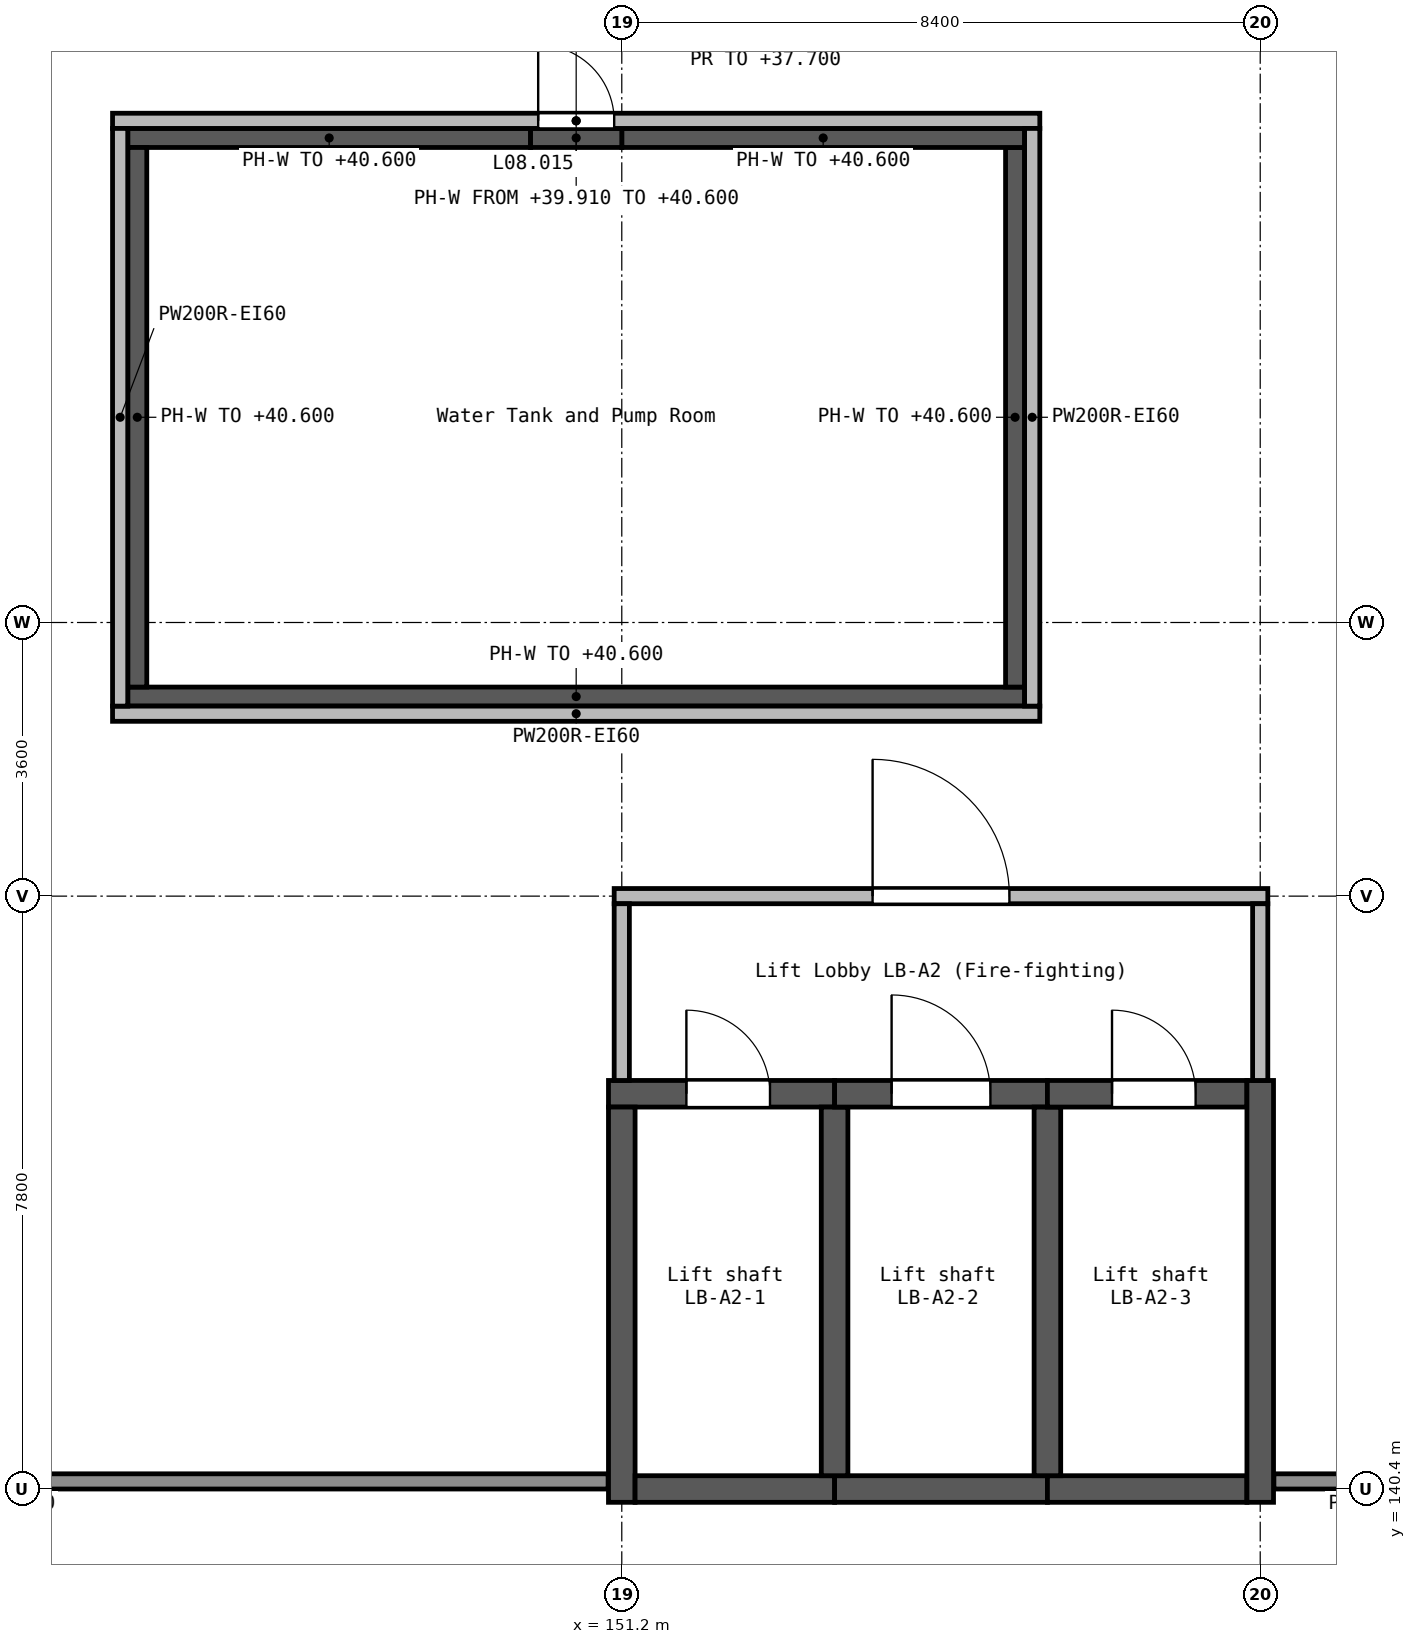
"""IFC4 building model, lengths in metres.
Left out: names, types, materials, properties, quantities, classifications, styles, units other than length and angle.
Written with IfcOpenShell. Run it as: python <this file> out.ifc"""

import sys

from ifc_helpers import new_model, si_unit, direction, frame, frame_2d, origin, place, context, subcontext, project, spatial, polyline, rectangle, outline, extrude, element, fill, save


model = new_model("IFC4")
c1 = context("Model", 3, precision=1e-05, world=origin(), true_north=direction((0.0, 1.0)))
c2 = subcontext(c1, "Body", "Model", "MODEL_VIEW")
j1 = project(units=[si_unit("LENGTHUNIT", "METRE"), si_unit("PLANEANGLEUNIT", "RADIAN")], contexts=[c1])
p1 = place(None, origin())
s1 = spatial("IfcSite", under=j1, at=p1, CompositionType="ELEMENT")
p2 = place(p1, origin())
s2 = spatial("IfcBuilding", under=s1, at=p2, CompositionType="ELEMENT")
p3 = place(p2, frame((0.0, 0.0, 36.6)))
s3 = spatial("IfcBuildingStorey", under=s2, at=p3, CompositionType="ELEMENT", Elevation=36.6)
p4 = place(p3, frame((151.025, 145.6, 0.0), z_axis=(0.0, 0.0, 1.0), x_axis=(1.0, 0.0, 0.0)))
e1 = element("IfcWall", 1, at=p4, inside=s3, PredefinedType="SHEAR", context=c2, shape_type="SweptSolid", body=[
    extrude(rectangle(XDim=2.975, YDim=0.35, at=frame_2d((1.488, 0.0))), origin(), (0.0, 0.0, 1.0), 4.0),
])
p5 = place(p4, frame((1.025, 0.0, 0.0)))
e2 = element("IfcOpeningElement", 2, at=p5, cuts=e1, PredefinedType="OPENING", context=c2, shape_type="SweptSolid", body=[
    extrude(rectangle(XDim=1.1, YDim=2.1, at=frame_2d((0.55, 1.05))), frame((0.0, 0.185, 0.0), z_axis=(0.0, -1.0, 0.0), x_axis=(1.0, 0.0, 0.0)), (0.0, 0.0, 1.0), 0.37),
])
p6 = place(p3, frame((151.2, 140.225, 0.0), z_axis=(0.0, 0.0, 1.0), x_axis=(0.0, 1.0, 0.0)))
e3 = element("IfcWall", 3, at=p6, inside=s3, PredefinedType="SHEAR", context=c2, shape_type="SweptSolid", body=[
    extrude(rectangle(XDim=5.2, YDim=0.35, at=frame_2d((2.6, 0.0))), origin(), (0.0, 0.0, 1.0), 4.0),
])
p7 = place(p3, frame((151.375, 140.4, 0.0), z_axis=(0.0, 0.0, 1.0), x_axis=(1.0, 0.0, 0.0)))
e4 = element("IfcWall", 4, at=p7, inside=s3, PredefinedType="SHEAR", context=c2, shape_type="SweptSolid", body=[
    extrude(rectangle(XDim=2.625, YDim=0.35, at=frame_2d((1.312, 0.0))), origin(), (0.0, 0.0, 1.0), 4.0),
])
p8 = place(p3, frame((154.0, 140.4, 0.0), z_axis=(0.0, 0.0, 1.0), x_axis=(1.0, 0.0, 0.0)))
e5 = element("IfcWall", 5, at=p8, inside=s3, PredefinedType="SHEAR", context=c2, shape_type="SweptSolid", body=[
    extrude(rectangle(XDim=2.8, YDim=0.35, at=frame_2d((1.4, 0.0))), origin(), (0.0, 0.0, 1.0), 4.0),
])
p9 = place(p3, frame((154.0, 140.575, 0.0), z_axis=(0.0, 0.0, 1.0), x_axis=(0.0, 1.0, 0.0)))
e6 = element("IfcWall", 6, at=p9, inside=s3, PredefinedType="SHEAR", context=c2, shape_type="SweptSolid", body=[
    extrude(rectangle(XDim=4.85, YDim=0.35, at=frame_2d((2.425, 0.0))), origin(), (0.0, 0.0, 1.0), 4.0),
])
p10 = place(p3, frame((154.0, 145.6, 0.0), z_axis=(0.0, 0.0, 1.0), x_axis=(1.0, 0.0, 0.0)))
e7 = element("IfcWall", 7, at=p10, inside=s3, PredefinedType="SHEAR", context=c2, shape_type="SweptSolid", body=[
    extrude(rectangle(XDim=2.8, YDim=0.35, at=frame_2d((1.4, 0.0))), origin(), (0.0, 0.0, 1.0), 4.0),
])
p11 = place(p10, frame((0.75, 0.0, 0.0)))
e8 = element("IfcOpeningElement", 8, at=p11, cuts=e7, PredefinedType="OPENING", context=c2, shape_type="SweptSolid", body=[
    extrude(rectangle(XDim=1.3, YDim=2.1, at=frame_2d((0.65, 1.05))), frame((0.0, 0.185, 0.0), z_axis=(0.0, -1.0, 0.0), x_axis=(1.0, 0.0, 0.0)), (0.0, 0.0, 1.0), 0.37),
])
p12 = place(p3, frame((156.8, 140.4, 0.0), z_axis=(0.0, 0.0, 1.0), x_axis=(1.0, 0.0, 0.0)))
e9 = element("IfcWall", 9, at=p12, inside=s3, PredefinedType="SHEAR", context=c2, shape_type="SweptSolid", body=[
    extrude(rectangle(XDim=2.625, YDim=0.35, at=frame_2d((1.312, 0.0))), origin(), (0.0, 0.0, 1.0), 4.0),
])
p13 = place(p3, frame((156.8, 140.575, 0.0), z_axis=(0.0, 0.0, 1.0), x_axis=(0.0, 1.0, 0.0)))
e10 = element("IfcWall", 10, at=p13, inside=s3, PredefinedType="SHEAR", context=c2, shape_type="SweptSolid", body=[
    extrude(rectangle(XDim=4.85, YDim=0.35, at=frame_2d((2.425, 0.0))), origin(), (0.0, 0.0, 1.0), 4.0),
])
p14 = place(p3, frame((156.8, 145.6, 0.0), z_axis=(0.0, 0.0, 1.0), x_axis=(1.0, 0.0, 0.0)))
e11 = element("IfcWall", 11, at=p14, inside=s3, PredefinedType="SHEAR", context=c2, shape_type="SweptSolid", body=[
    extrude(rectangle(XDim=2.625, YDim=0.35, at=frame_2d((1.312, 0.0))), origin(), (0.0, 0.0, 1.0), 4.0),
])
p15 = place(p14, frame((0.85, 0.0, 0.0)))
e12 = element("IfcOpeningElement", 12, at=p15, cuts=e11, PredefinedType="OPENING", context=c2, shape_type="SweptSolid", body=[
    extrude(rectangle(XDim=1.1, YDim=2.1, at=frame_2d((0.55, 1.05))), frame((0.0, 0.185, 0.0), z_axis=(0.0, -1.0, 0.0), x_axis=(1.0, 0.0, 0.0)), (0.0, 0.0, 1.0), 0.37),
])
p16 = place(p3, frame((159.6, 140.225, 0.0), z_axis=(0.0, 0.0, 1.0), x_axis=(0.0, 1.0, 0.0)))
e13 = element("IfcWall", 13, at=p16, inside=s3, PredefinedType="SHEAR", context=c2, shape_type="SweptSolid", body=[
    extrude(rectangle(XDim=5.55, YDim=0.35, at=frame_2d((2.775, 0.0))), origin(), (0.0, 0.0, 1.0), 4.0),
])
p17 = place(p3, origin())
e14 = element("IfcWall", 14, at=p17, inside=s3, PredefinedType="PARAPET", context=c2, shape_type="SweptSolid", body=[
    extrude(outline(polyline([(151.02, 140.6), (151.02, 140.4), (134.475, 140.4), (134.475, 140.6), (151.02, 140.6)])), origin(), (0.0, 0.0, 1.0), 1.1),
])
p18 = place(p3, origin())
e15 = element("IfcWall", 15, at=p18, inside=s3, PredefinedType="PARAPET", context=c2, shape_type="SweptSolid", body=[
    extrude(outline(polyline([(163.2, 140.6), (163.2, 140.4), (159.78, 140.4), (159.78, 140.6), (163.2, 140.6)])), origin(), (0.0, 0.0, 1.0), 1.1),
])
p19 = place(p3, origin())
e16 = element("IfcWall", 16, at=p19, inside=s3, PredefinedType="SOLIDWALL", context=c2, shape_type="SweptSolid", body=[
    extrude(outline(polyline([(144.7, 150.7), (156.5, 150.7), (156.5, 150.95), (144.7, 150.95), (144.7, 150.7)])), origin(), (0.0, 0.0, 1.0), 4.0),
])
p20 = place(p3, origin())
e17 = element("IfcWall", 17, at=p20, inside=s3, PredefinedType="SOLIDWALL", context=c2, shape_type="SweptSolid", body=[
    extrude(outline(polyline([(144.7, 158.05), (144.7, 158.3), (150.0, 158.3), (150.0, 158.05), (144.7, 158.05)])), origin(), (0.0, 0.0, 1.0), 4.0),
])
p21 = place(p3, origin())
e18 = element("IfcWall", 18, at=p21, inside=s3, PredefinedType="SOLIDWALL", context=c2, shape_type="SweptSolid", body=[
    extrude(outline(polyline([(144.7, 150.95), (144.95, 150.95), (144.95, 158.05), (144.7, 158.05), (144.7, 150.95)])), origin(), (0.0, 0.0, 1.0), 4.0),
])
p22 = place(p3, origin())
e19 = element("IfcWall", 19, at=p22, inside=s3, PredefinedType="SOLIDWALL", context=c2, shape_type="SweptSolid", body=[
    extrude(outline(polyline([(156.25, 150.95), (156.5, 150.95), (156.5, 158.05), (156.25, 158.05), (156.25, 150.95)])), origin(), (0.0, 0.0, 1.0), 4.0),
])
p23 = place(p3, frame((144.5, 150.6, 0.0), z_axis=(0.0, 0.0, 1.0), x_axis=(1.0, 0.0, 0.0)))
e20 = element("IfcWall", 20, at=p23, inside=s3, PredefinedType="SOLIDWALL", context=c2, shape_type="SweptSolid", body=[
    extrude(rectangle(XDim=12.2, YDim=0.2, at=frame_2d((6.1, 0.0))), origin(), (0.0, 0.0, 1.0), 3.9),
])
p24 = place(p3, frame((144.5, 158.4, 0.0), z_axis=(0.0, 0.0, 1.0), x_axis=(1.0, 0.0, 0.0)))
e21 = element("IfcWall", 21, at=p24, inside=s3, PredefinedType="SOLIDWALL", context=c2, shape_type="SweptSolid", body=[
    extrude(rectangle(XDim=12.2, YDim=0.2, at=frame_2d((6.1, 0.0))), origin(), (0.0, 0.0, 1.0), 3.9),
])
p25 = place(p24, frame((5.6, 0.0, 0.0)))
e22 = element("IfcOpeningElement", 22, at=p25, cuts=e21, PredefinedType="OPENING", context=c2, shape_type="SweptSolid", body=[
    extrude(rectangle(XDim=1.0, YDim=2.1, at=frame_2d((0.5, 1.05))), frame((0.0, 0.11, 0.0), z_axis=(0.0, -1.0, 0.0), x_axis=(1.0, 0.0, 0.0)), (0.0, 0.0, 1.0), 0.22),
])
p26 = place(p3, frame((151.1, 148.2, 0.0), z_axis=(0.0, 0.0, 1.0), x_axis=(1.0, 0.0, 0.0)))
e23 = element("IfcWall", 23, at=p26, inside=s3, PredefinedType="SOLIDWALL", context=c2, shape_type="SweptSolid", body=[
    extrude(rectangle(XDim=8.6, YDim=0.2, at=frame_2d((4.3, 0.0))), origin(), (0.0, 0.0, 1.0), 3.9),
])
p27 = place(p26, frame((3.4, 0.0, 0.0)))
e24 = element("IfcOpeningElement", 24, at=p27, cuts=e23, PredefinedType="OPENING", context=c2, shape_type="SweptSolid", body=[
    extrude(rectangle(XDim=1.8, YDim=2.1, at=frame_2d((0.9, 1.05))), frame((0.0, 0.11, 0.0), z_axis=(0.0, -1.0, 0.0), x_axis=(1.0, 0.0, 0.0)), (0.0, 0.0, 1.0), 0.22),
])
for number, where, z_axis, x_axis in (
    (25, (144.6, 150.7, 0.0), (0.0, 0.0, 1.0), (0.0, 1.0, 0.0)),
    (26, (156.6, 150.7, 0.0), (0.0, 0.0, 1.0), (0.0, 1.0, 0.0)),
):
    element("IfcWall", number, at=place(p3, frame(where, z_axis=z_axis, x_axis=x_axis)), inside=s3, PredefinedType="SOLIDWALL", context=c2, shape_type="SweptSolid", body=[
        extrude(rectangle(XDim=7.6, YDim=0.2, at=frame_2d((3.8, 0.0))), origin(), (0.0, 0.0, 1.0), 3.9),
    ])
for number, where, z_axis, x_axis in (
    (27, (151.2, 145.775, 0.0), (0.0, 0.0, 1.0), (0.0, 1.0, 0.0)),
    (28, (159.6, 145.775, 0.0), (0.0, 0.0, 1.0), (0.0, 1.0, 0.0)),
):
    element("IfcWall", number, at=place(p3, frame(where, z_axis=z_axis, x_axis=x_axis)), inside=s3, PredefinedType="SOLIDWALL", context=c2, shape_type="SweptSolid", body=[
        extrude(rectangle(XDim=2.325, YDim=0.2, at=frame_2d((1.163, 0.0))), origin(), (0.0, 0.0, 1.0), 3.9),
    ])
p28 = place(p3, origin())
e29 = element("IfcWall", 29, at=p28, inside=s3, PredefinedType="SOLIDWALL", context=c2, shape_type="SweptSolid", body=[
    extrude(outline(polyline([(156.5, 158.3), (156.5, 158.05), (151.2, 158.05), (151.2, 158.3), (156.5, 158.3)])), origin(), (0.0, 0.0, 1.0), 4.0),
])
p29 = place(p3, frame((0.0, 0.0, 3.31)))
e30 = element("IfcWall", 30, at=p29, inside=s3, PredefinedType="SOLIDWALL", context=c2, shape_type="SweptSolid", body=[
    extrude(outline(polyline([(150.0, 158.05), (150.0, 158.3), (151.2, 158.3), (151.2, 158.05), (150.0, 158.05)])), origin(), (0.0, 0.0, 1.0), 0.69),
])
p30 = place(p27, frame((1.8, 0.0, 0.0), z_axis=(0.0, 0.0, 1.0), x_axis=(-1.0, 0.0, 0.0)))
e31 = element("IfcDoor", 31, at=p30, inside=s3, OperationType="DOUBLE_DOOR_SINGLE_SWING", PredefinedType="DOOR", context=c2, shape_type="SweptSolid", body=[
    extrude(rectangle(XDim=1.8, YDim=2.1, at=frame_2d((0.9, 1.05))), frame((0.0, 0.025, 0.0), z_axis=(0.0, -1.0, 0.0), x_axis=(1.0, 0.0, 0.0)), (0.0, 0.0, 1.0), 0.05),
])
fill(e24, e31)
p31 = place(p5, origin())
e32 = element("IfcDoor", 32, at=p31, inside=s3, OperationType="DOUBLE_DOOR_SLIDING", PredefinedType="DOOR", context=c2, shape_type="SweptSolid", body=[
    extrude(rectangle(XDim=1.1, YDim=2.1, at=frame_2d((0.55, 1.05))), frame((0.0, 0.025, 0.0), z_axis=(0.0, -1.0, 0.0), x_axis=(1.0, 0.0, 0.0)), (0.0, 0.0, 1.0), 0.05),
])
fill(e2, e32)
p32 = place(p11, origin())
e33 = element("IfcDoor", 33, at=p32, inside=s3, OperationType="DOUBLE_DOOR_SLIDING", PredefinedType="DOOR", context=c2, shape_type="SweptSolid", body=[
    extrude(rectangle(XDim=1.3, YDim=2.1, at=frame_2d((0.65, 1.05))), frame((0.0, 0.025, 0.0), z_axis=(0.0, -1.0, 0.0), x_axis=(1.0, 0.0, 0.0)), (0.0, 0.0, 1.0), 0.05),
])
fill(e8, e33)
p33 = place(p15, origin())
e34 = element("IfcDoor", 34, at=p33, inside=s3, OperationType="DOUBLE_DOOR_SLIDING", PredefinedType="DOOR", context=c2, shape_type="SweptSolid", body=[
    extrude(rectangle(XDim=1.1, YDim=2.1, at=frame_2d((0.55, 1.05))), frame((0.0, 0.025, 0.0), z_axis=(0.0, -1.0, 0.0), x_axis=(1.0, 0.0, 0.0)), (0.0, 0.0, 1.0), 0.05),
])
fill(e12, e34)
p34 = place(p25, origin())
e35 = element("IfcDoor", 35, at=p34, inside=s3, OperationType="SINGLE_SWING_LEFT", PredefinedType="DOOR", context=c2, shape_type="SweptSolid", body=[
    extrude(rectangle(XDim=1.0, YDim=2.1, at=frame_2d((0.5, 1.05))), frame((0.0, 0.025, 0.0), z_axis=(0.0, -1.0, 0.0), x_axis=(1.0, 0.0, 0.0)), (0.0, 0.0, 1.0), 0.05),
])
fill(e22, e35)
save(model, sys.argv[1])
